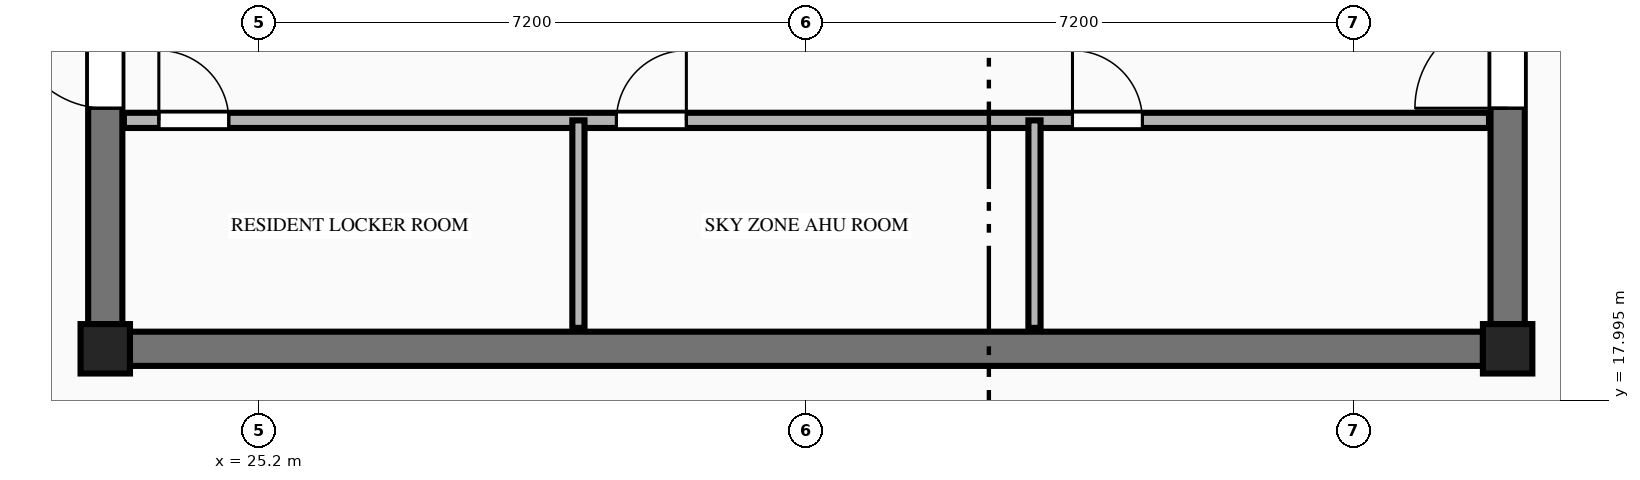
"""IFC4 building model, lengths in metres.
Left out: names, types, materials, properties, quantities, classifications, styles, units other than length and angle.
Written with IfcOpenShell. Run it as: python <this file> out.ifc"""

import sys

from ifc_helpers import new_model, si_unit, direction, frame, frame_2d, origin, origin_2d, place, context, subcontext, project, spatial, rectangle, extrude, element, fill, save


model = new_model("IFC4")
c1 = context("Model", 3, precision=1e-05, world=origin(), true_north=direction((0.0, 1.0)))
c2 = subcontext(c1, "Body", "Model", "MODEL_VIEW")
j1 = project(units=[si_unit("LENGTHUNIT", "METRE"), si_unit("PLANEANGLEUNIT", "RADIAN")], contexts=[c1])
p1 = place(None, origin())
s1 = spatial("IfcSite", under=j1, at=p1, CompositionType="ELEMENT")
p2 = place(p1, origin())
s2 = spatial("IfcBuilding", under=s1, at=p2, CompositionType="ELEMENT")
p3 = place(p2, frame((0.0, 0.0, 237.95)))
s3 = spatial("IfcBuildingStorey", under=s2, at=p3, CompositionType="ELEMENT", Elevation=237.95)
for number, where, z_axis, x_axis in (
    (1, (23.175, 18.675, 0.0), (0.0, 0.0, 1.0), (1.0, 0.0, 0.0)),
    (2, (41.625, 18.675, 0.0), (0.0, 0.0, 1.0), (1.0, 0.0, 0.0)),
):
    element("IfcColumn", number, at=place(p3, frame(where, z_axis=z_axis, x_axis=x_axis)), inside=s3, PredefinedType="COLUMN", context=c2, shape_type="SweptSolid", body=[
        extrude(rectangle(XDim=0.65, YDim=0.65, at=origin_2d()), origin(), (0.0, 0.0, 1.0), 3.65),
    ])
p4 = place(p3, frame((23.5, 18.675, 0.0), z_axis=(0.0, 0.0, 1.0), x_axis=(1.0, 0.0, 0.0)))
e3 = element("IfcWall", 3, at=p4, inside=s3, PredefinedType="SHEAR", context=c2, shape_type="SweptSolid", body=[
    extrude(rectangle(XDim=17.8, YDim=0.45, at=frame_2d((8.9, 0.0))), origin(), (0.0, 0.0, 1.0), 3.45),
])
p5 = place(p3, frame((23.175, 19.0, 0.0), z_axis=(0.0, 0.0, 1.0), x_axis=(0.0, 1.0, 0.0)))
e4 = element("IfcWall", 4, at=p5, inside=s3, PredefinedType="SHEAR", context=c2, shape_type="SweptSolid", body=[
    extrude(rectangle(XDim=13.8, YDim=0.45, at=frame_2d((6.9, 0.0))), origin(), (0.0, 0.0, 1.0), 3.45),
])
p6 = place(p5, frame((2.84, 0.0, 0.0)))
e5 = element("IfcOpeningElement", 5, at=p6, cuts=e4, PredefinedType="OPENING", context=c2, shape_type="SweptSolid", body=[
    extrude(rectangle(XDim=1.22, YDim=2.25, at=frame_2d((0.61, 1.125))), frame((0.0, 0.235, 0.0), z_axis=(0.0, -1.0, 0.0), x_axis=(1.0, 0.0, 0.0)), (0.0, 0.0, 1.0), 0.47),
])
p7 = place(p3, frame((41.625, 19.0, 0.0), z_axis=(0.0, 0.0, 1.0), x_axis=(0.0, 1.0, 0.0)))
e6 = element("IfcWall", 6, at=p7, inside=s3, PredefinedType="SHEAR", context=c2, shape_type="SweptSolid", body=[
    extrude(rectangle(XDim=13.8, YDim=0.45, at=frame_2d((6.9, 0.0))), origin(), (0.0, 0.0, 1.0), 3.45),
])
p8 = place(p7, frame((2.84, 0.0, 0.0)))
e7 = element("IfcOpeningElement", 7, at=p8, cuts=e6, PredefinedType="OPENING", context=c2, shape_type="SweptSolid", body=[
    extrude(rectangle(XDim=1.22, YDim=2.25, at=frame_2d((0.61, 1.125))), frame((0.0, 0.235, 0.0), z_axis=(0.0, -1.0, 0.0), x_axis=(1.0, 0.0, 0.0)), (0.0, 0.0, 1.0), 0.47),
])
p9 = place(p3, frame((23.42, 21.68, 0.0), z_axis=(0.0, 0.0, 1.0), x_axis=(1.0, 0.0, 0.0)))
e8 = element("IfcWall", 8, at=p9, inside=s3, PredefinedType="PLUMBINGWALL", context=c2, shape_type="SweptSolid", body=[
    extrude(rectangle(XDim=17.96, YDim=0.2, at=frame_2d((8.98, 0.0))), origin(), (0.0, 0.0, 1.0), 3.45),
])
p10 = place(p9, frame((0.46, 0.0, 0.0)))
e9 = element("IfcOpeningElement", 9, at=p10, cuts=e8, PredefinedType="OPENING", context=c2, shape_type="SweptSolid", body=[
    extrude(rectangle(XDim=0.92, YDim=2.15, at=frame_2d((0.46, 1.075))), frame((0.0, 0.11, 0.0), z_axis=(0.0, -1.0, 0.0), x_axis=(1.0, 0.0, 0.0)), (0.0, 0.0, 1.0), 0.22),
])
p11 = place(p9, frame((6.48, 0.0, 0.0)))
e10 = element("IfcOpeningElement", 10, at=p11, cuts=e8, PredefinedType="OPENING", context=c2, shape_type="SweptSolid", body=[
    extrude(rectangle(XDim=0.92, YDim=2.15, at=frame_2d((0.46, 1.075))), frame((0.0, 0.11, 0.0), z_axis=(0.0, -1.0, 0.0), x_axis=(1.0, 0.0, 0.0)), (0.0, 0.0, 1.0), 0.22),
])
p12 = place(p9, frame((12.48, 0.0, 0.0)))
e11 = element("IfcOpeningElement", 11, at=p12, cuts=e8, PredefinedType="OPENING", context=c2, shape_type="SweptSolid", body=[
    extrude(rectangle(XDim=0.92, YDim=2.15, at=frame_2d((0.46, 1.075))), frame((0.0, 0.11, 0.0), z_axis=(0.0, -1.0, 0.0), x_axis=(1.0, 0.0, 0.0)), (0.0, 0.0, 1.0), 0.22),
])
for number, where, z_axis, x_axis in (
    (12, (29.4, 18.95, 0.0), (0.0, 0.0, 1.0), (0.0, 1.0, 0.0)),
    (13, (35.4, 18.95, 0.0), (0.0, 0.0, 1.0), (0.0, 1.0, 0.0)),
):
    element("IfcWall", number, at=place(p3, frame(where, z_axis=z_axis, x_axis=x_axis)), inside=s3, PredefinedType="PARTITIONING", context=c2, shape_type="SweptSolid", body=[
        extrude(rectangle(XDim=2.73, YDim=0.16, at=frame_2d((1.365, 0.0))), origin(), (0.0, 0.0, 1.0), 3.45),
    ])
p13 = place(p6, origin())
e14 = element("IfcDoor", 14, at=p13, inside=s3, OperationType="SINGLE_SWING_RIGHT", PredefinedType="DOOR", context=c2, shape_type="SweptSolid", body=[
    extrude(rectangle(XDim=1.22, YDim=2.25, at=frame_2d((0.61, 1.125))), frame((0.0, 0.025, 0.0), z_axis=(0.0, -1.0, 0.0), x_axis=(1.0, 0.0, 0.0)), (0.0, 0.0, 1.0), 0.05),
])
fill(e5, e14)
p14 = place(p8, origin())
e15 = element("IfcDoor", 15, at=p14, inside=s3, OperationType="SINGLE_SWING_LEFT", PredefinedType="DOOR", context=c2, shape_type="SweptSolid", body=[
    extrude(rectangle(XDim=1.22, YDim=2.25, at=frame_2d((0.61, 1.125))), frame((0.0, 0.025, 0.0), z_axis=(0.0, -1.0, 0.0), x_axis=(1.0, 0.0, 0.0)), (0.0, 0.0, 1.0), 0.05),
])
fill(e7, e15)
p15 = place(p10, origin())
e16 = element("IfcDoor", 16, at=p15, inside=s3, OperationType="SINGLE_SWING_LEFT", PredefinedType="DOOR", context=c2, shape_type="SweptSolid", body=[
    extrude(rectangle(XDim=0.92, YDim=2.15, at=frame_2d((0.46, 1.075))), frame((0.0, 0.025, 0.0), z_axis=(0.0, -1.0, 0.0), x_axis=(1.0, 0.0, 0.0)), (0.0, 0.0, 1.0), 0.05),
])
fill(e9, e16)
p16 = place(p11, origin())
e17 = element("IfcDoor", 17, at=p16, inside=s3, OperationType="SINGLE_SWING_RIGHT", PredefinedType="DOOR", context=c2, shape_type="SweptSolid", body=[
    extrude(rectangle(XDim=0.92, YDim=2.15, at=frame_2d((0.46, 1.075))), frame((0.0, 0.025, 0.0), z_axis=(0.0, -1.0, 0.0), x_axis=(1.0, 0.0, 0.0)), (0.0, 0.0, 1.0), 0.05),
])
fill(e10, e17)
p17 = place(p12, origin())
e18 = element("IfcDoor", 18, at=p17, inside=s3, OperationType="SINGLE_SWING_LEFT", PredefinedType="DOOR", context=c2, shape_type="SweptSolid", body=[
    extrude(rectangle(XDim=0.92, YDim=2.15, at=frame_2d((0.46, 1.075))), frame((0.0, 0.025, 0.0), z_axis=(0.0, -1.0, 0.0), x_axis=(1.0, 0.0, 0.0)), (0.0, 0.0, 1.0), 0.05),
])
fill(e11, e18)
save(model, sys.argv[1])
